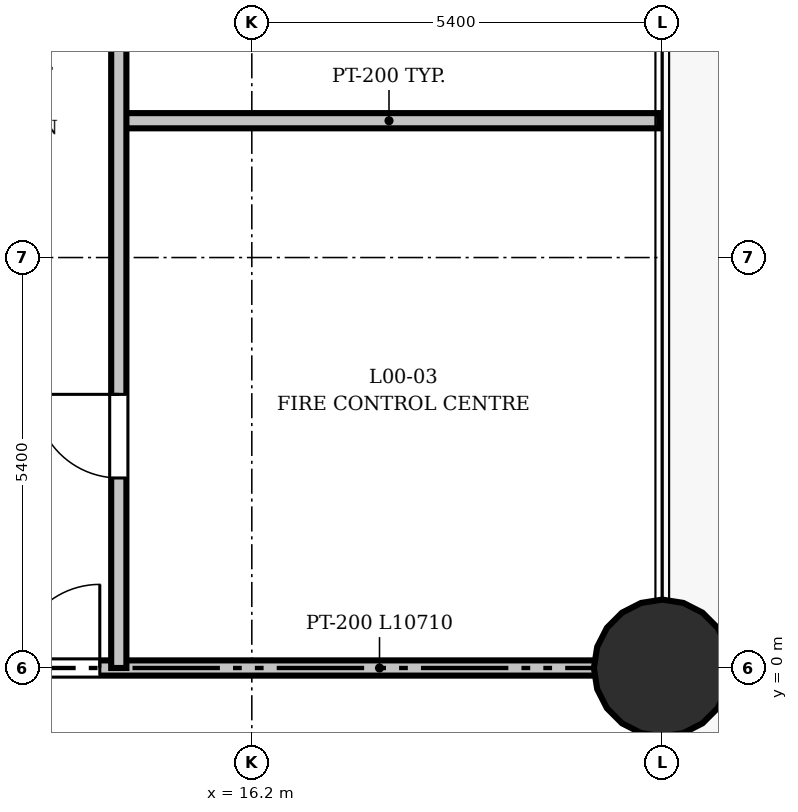
"""IFC4 building model, lengths in metres.
Left out: names, types, materials, properties, quantities, classifications, styles, units other than length and angle.
Written with IfcOpenShell. Run it as: python <this file> out.ifc"""

import sys

from ifc_helpers import new_model, si_unit, direction, frame, frame_2d, origin, origin_2d, place, context, subcontext, project, spatial, rectangle, circle, extrude, element, fill, save


model = new_model("IFC4")
c1 = context("Model", 3, precision=1e-05, world=origin(), true_north=direction((0.0, 1.0)))
c2 = subcontext(c1, "Body", "Model", "MODEL_VIEW")
j1 = project(units=[si_unit("LENGTHUNIT", "METRE"), si_unit("PLANEANGLEUNIT", "RADIAN")], contexts=[c1])
p1 = place(None, origin())
s1 = spatial("IfcSite", under=j1, at=p1, CompositionType="ELEMENT")
p2 = place(p1, origin())
s2 = spatial("IfcBuilding", under=s1, at=p2, CompositionType="ELEMENT")
p3 = place(p2, origin())
s3 = spatial("IfcBuildingStorey", under=s2, at=p3, CompositionType="ELEMENT", Elevation=0.0)
p4 = place(p3, frame((21.6, 0.0, 0.0), z_axis=(0.0, 0.0, 1.0), x_axis=(1.0, 0.0, 0.0)))
e1 = element("IfcColumn", 1, at=p4, inside=s3, PredefinedType="COLUMN", context=c2, shape_type="SweptSolid", body=[
    extrude(circle(Radius=0.9, at=origin_2d()), origin(), (0.0, 0.0, 1.0), 4.5),
])
p5 = place(p3, frame((14.45, 7.2, 0.0), z_axis=(0.0, 0.0, 1.0), x_axis=(1.0, 0.0, 0.0)))
e2 = element("IfcWall", 2, at=p5, inside=s3, PredefinedType="PARTITIONING", context=c2, shape_type="SweptSolid", body=[
    extrude(rectangle(XDim=7.11, YDim=0.2, at=frame_2d((3.555, 0.0))), origin(), (0.0, 0.0, 1.0), 3.329),
])
p6 = place(p3, frame((10.85, 0.0, 0.0), z_axis=(0.0, 0.0, 1.0), x_axis=(1.0, 0.0, 0.0)))
e3 = element("IfcWall", 3, at=p6, inside=s3, PredefinedType="PARTITIONING", context=c2, shape_type="SweptSolid", body=[
    extrude(rectangle(XDim=10.71, YDim=0.2, at=frame_2d((5.355, 0.0))), origin(), (0.0, 0.0, 1.0), 2.205),
])
p7 = place(p6, frame((2.25, 0.0, 0.0)))
e4 = element("IfcOpeningElement", 4, at=p7, cuts=e3, PredefinedType="OPENING", context=c2, shape_type="SweptSolid", body=[
    extrude(rectangle(XDim=1.1, YDim=2.1, at=frame_2d((0.55, 1.05))), frame((0.0, 0.11, 0.0), z_axis=(0.0, -1.0, 0.0), x_axis=(1.0, 0.0, 0.0)), (0.0, 0.0, 1.0), 0.22),
])
p8 = place(p3, frame((14.45, 0.0, 0.0), z_axis=(0.0, 0.0, 1.0), x_axis=(0.0, 1.0, 0.0)))
e5 = element("IfcWall", 5, at=p8, inside=s3, PredefinedType="PARTITIONING", context=c2, shape_type="SweptSolid", body=[
    extrude(rectangle(XDim=13.9, YDim=0.2, at=frame_2d((6.95, 0.0))), origin(), (0.0, 0.0, 1.0), 3.329),
])
p9 = place(p8, frame((2.5, 0.0, 0.0)))
e6 = element("IfcOpeningElement", 6, at=p9, cuts=e5, PredefinedType="OPENING", context=c2, shape_type="SweptSolid", body=[
    extrude(rectangle(XDim=1.1, YDim=2.1, at=frame_2d((0.55, 1.05))), frame((0.0, 0.11, 0.0), z_axis=(0.0, -1.0, 0.0), x_axis=(1.0, 0.0, 0.0)), (0.0, 0.0, 1.0), 0.22),
])
p10 = place(p8, frame((9.5, 0.0, 0.0)))
e7 = element("IfcOpeningElement", 7, at=p10, cuts=e5, PredefinedType="OPENING", context=c2, shape_type="SweptSolid", body=[
    extrude(rectangle(XDim=1.1, YDim=2.1, at=frame_2d((0.55, 1.05))), frame((0.0, 0.11, 0.0), z_axis=(0.0, -1.0, 0.0), x_axis=(1.0, 0.0, 0.0)), (0.0, 0.0, 1.0), 0.22),
])
p11 = place(p7, origin())
e8 = element("IfcDoor", 8, at=p11, inside=s3, OperationType="SINGLE_SWING_RIGHT", PredefinedType="DOOR", context=c2, shape_type="SweptSolid", body=[
    extrude(rectangle(XDim=1.1, YDim=2.1, at=frame_2d((0.55, 1.05))), frame((0.0, 0.025, 0.0), z_axis=(0.0, -1.0, 0.0), x_axis=(1.0, 0.0, 0.0)), (0.0, 0.0, 1.0), 0.05),
])
fill(e4, e8)
p12 = place(p9, origin())
e9 = element("IfcDoor", 9, at=p12, inside=s3, OperationType="SINGLE_SWING_RIGHT", PredefinedType="DOOR", context=c2, shape_type="SweptSolid", body=[
    extrude(rectangle(XDim=1.1, YDim=2.1, at=frame_2d((0.55, 1.05))), frame((0.0, 0.025, 0.0), z_axis=(0.0, -1.0, 0.0), x_axis=(1.0, 0.0, 0.0)), (0.0, 0.0, 1.0), 0.05),
])
fill(e6, e9)
save(model, sys.argv[1])
